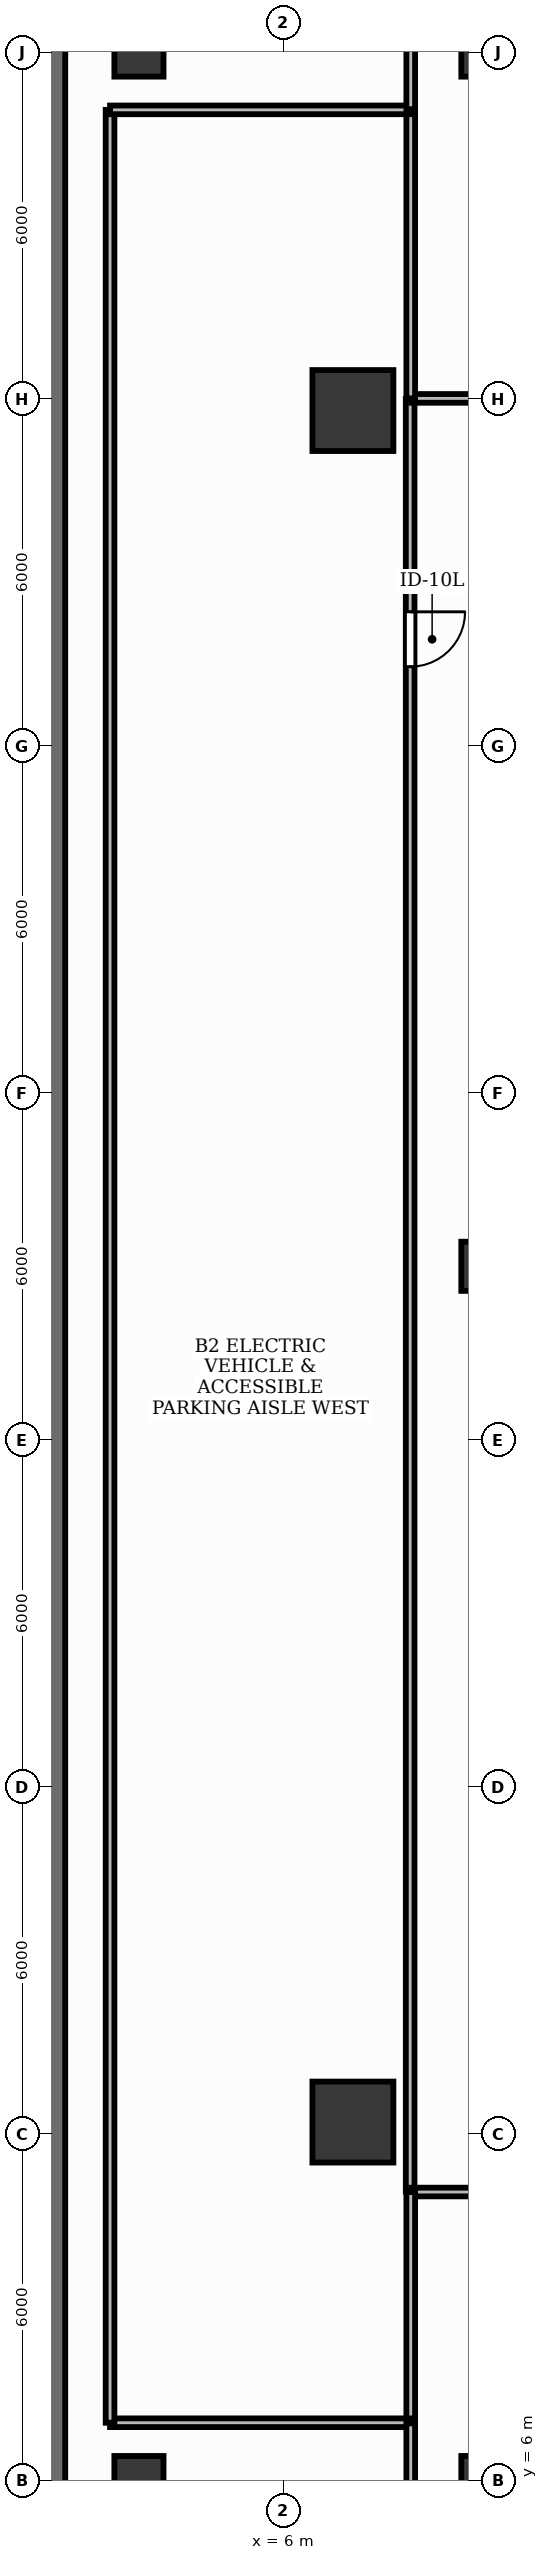
"""IFC4 building model, lengths in metres.
Left out: names, types, materials, properties, quantities, classifications, styles, units other than length and angle.
Written with IfcOpenShell. Run it as: python <this file> out.ifc"""

import sys

from ifc_helpers import new_model, si_unit, direction, frame, frame_2d, origin, origin_2d, place, context, subcontext, project, spatial, rectangle, extrude, element, fill, save


model = new_model("IFC4")
c1 = context("Model", 3, precision=1e-05, world=origin(), true_north=direction((0.0, 1.0)))
c2 = subcontext(c1, "Body", "Model", "MODEL_VIEW")
j1 = project(units=[si_unit("LENGTHUNIT", "METRE"), si_unit("PLANEANGLEUNIT", "RADIAN")], contexts=[c1])
p1 = place(None, origin())
s1 = spatial("IfcSite", under=j1, at=p1, CompositionType="ELEMENT")
p2 = place(p1, origin())
s2 = spatial("IfcBuilding", under=s1, at=p2, CompositionType="ELEMENT")
p3 = place(p2, frame((0.0, 0.0, -9.0)))
s3 = spatial("IfcBuildingStorey", under=s2, at=p3, CompositionType="ELEMENT", Elevation=-9.0)
p4 = place(p3, frame((2.0, 3.25, 0.0), z_axis=(0.0, 0.0, 1.0), x_axis=(0.0, 1.0, 0.0)))
e1 = element("IfcWall", 1, at=p4, inside=s3, PredefinedType="USERDEFINED", context=c2, shape_type="SweptSolid", body=[
    extrude(rectangle(XDim=47.5, YDim=0.45, at=frame_2d((23.75, 0.0))), origin(), (0.0, 0.0, 1.0), 4.18),
])
for number, where, z_axis, x_axis in (
    (2, (3.5, 6.0, 0.0), (0.0, 0.0, 1.0), (1.0, 0.0, 0.0)),
    (3, (3.5, 48.0, 0.0), (0.0, 0.0, 1.0), (1.0, 0.0, 0.0)),
    (4, (9.5, 6.0, 0.0), (0.0, 0.0, 1.0), (1.0, 0.0, 0.0)),
    (5, (9.5, 27.0, 0.0), (0.0, 0.0, 1.0), (1.0, 0.0, 0.0)),
    (6, (9.5, 48.0, 0.0), (0.0, 0.0, 1.0), (1.0, 0.0, 0.0)),
):
    element("IfcColumn", number, at=place(p3, frame(where, z_axis=z_axis, x_axis=x_axis)), inside=s3, PredefinedType="COLUMN", context=c2, shape_type="SweptSolid", body=[
        extrude(rectangle(XDim=0.85, YDim=0.85, at=origin_2d()), origin(), (0.0, 0.0, 1.0), 4.18),
    ])
for number, where, z_axis, x_axis in (
    (7, (7.2, 12.2, 0.0), (0.0, 0.0, 1.0), (1.0, 0.0, 0.0)),
    (8, (7.2, 41.8, 0.0), (0.0, 0.0, 1.0), (1.0, 0.0, 0.0)),
):
    element("IfcColumn", number, at=place(p3, frame(where, z_axis=z_axis, x_axis=x_axis)), inside=s3, PredefinedType="COLUMN", context=c2, shape_type="SweptSolid", body=[
        extrude(rectangle(XDim=1.4, YDim=1.4, at=origin_2d()), origin(), (0.0, 0.0, 1.0), 4.18),
    ])
p5 = place(p3, frame((8.19, 42.0, 0.0), z_axis=(0.0, 0.0, 1.0), x_axis=(0.0, -1.0, 0.0)))
e9 = element("IfcWall", 9, at=p5, inside=s3, PredefinedType="PARTITIONING", context=c2, shape_type="SweptSolid", body=[
    extrude(rectangle(XDim=31.0, YDim=0.15, at=frame_2d((15.5, 0.0))), origin(), (0.0, 0.0, 1.0), 3.04),
])
p6 = place(p5, frame((3.681, 0.0, 0.0)))
e10 = element("IfcOpeningElement", 10, at=p6, cuts=e9, PredefinedType="OPENING", context=c2, shape_type="SweptSolid", body=[
    extrude(rectangle(XDim=0.95, YDim=2.15, at=frame_2d((0.475, 1.075))), frame((0.0, 0.09, 0.0), z_axis=(0.0, -1.0, 0.0), x_axis=(1.0, 0.0, 0.0)), (0.0, 0.0, 1.0), 0.18),
])
p7 = place(p3, frame((52.0, 42.01, 0.0), z_axis=(0.0, 0.0, 1.0), x_axis=(-1.0, 0.0, 0.0)))
e11 = element("IfcWall", 11, at=p7, inside=s3, PredefinedType="PARTITIONING", context=c2, shape_type="SweptSolid", body=[
    extrude(rectangle(XDim=43.79, YDim=0.15, at=frame_2d((21.895, 0.0))), origin(), (0.0, 0.0, 1.0), 3.04),
])
p8 = place(p7, frame((3.333, 0.0, 0.0)))
e12 = element("IfcOpeningElement", 12, at=p8, cuts=e11, PredefinedType="OPENING", context=c2, shape_type="SweptSolid", body=[
    extrude(rectangle(XDim=0.95, YDim=2.15, at=frame_2d((0.475, 1.075))), frame((0.0, 0.09, 0.0), z_axis=(0.0, -1.0, 0.0), x_axis=(1.0, 0.0, 0.0)), (0.0, 0.0, 1.0), 0.18),
])
p9 = place(p3, frame((8.21, 10.99, 0.0), z_axis=(0.0, 0.0, 1.0), x_axis=(1.0, 0.0, 0.0)))
e13 = element("IfcWall", 13, at=p9, inside=s3, PredefinedType="PARTITIONING", context=c2, shape_type="SweptSolid", body=[
    extrude(rectangle(XDim=43.79, YDim=0.15, at=frame_2d((21.895, 0.0))), origin(), (0.0, 0.0, 1.0), 3.04),
])
p10 = place(p9, frame((6.435, 0.0, 0.0)))
e14 = element("IfcOpeningElement", 14, at=p10, cuts=e13, PredefinedType="OPENING", context=c2, shape_type="SweptSolid", body=[
    extrude(rectangle(XDim=0.95, YDim=2.15, at=frame_2d((0.475, 1.075))), frame((0.0, 0.09, 0.0), z_axis=(0.0, -1.0, 0.0), x_axis=(1.0, 0.0, 0.0)), (0.0, 0.0, 1.0), 0.18),
])
p11 = place(p3, frame((8.2, 47.0, 0.0), z_axis=(0.0, 0.0, 1.0), x_axis=(0.0, -1.0, 0.0)))
e15 = element("IfcWall", 15, at=p11, inside=s3, PredefinedType="PARTITIONING", context=c2, shape_type="SweptSolid", body=[
    extrude(rectangle(XDim=4.99, YDim=0.15, at=frame_2d((2.495, 0.0))), origin(), (0.0, 0.0, 1.0), 3.04),
])
p12 = place(p3, frame((8.2, 10.99, 0.0), z_axis=(0.0, 0.0, 1.0), x_axis=(0.0, -1.0, 0.0)))
e16 = element("IfcWall", 16, at=p12, inside=s3, PredefinedType="PARTITIONING", context=c2, shape_type="SweptSolid", body=[
    extrude(rectangle(XDim=3.99, YDim=0.15, at=frame_2d((1.995, 0.0))), origin(), (0.0, 0.0, 1.0), 3.04),
])
p13 = place(p3, frame((8.2, 7.0, 0.0), z_axis=(0.0, 0.0, 1.0), x_axis=(-1.0, 0.0, 0.0)))
e17 = element("IfcWall", 17, at=p13, inside=s3, PredefinedType="PARTITIONING", context=c2, shape_type="SweptSolid", body=[
    extrude(rectangle(XDim=5.2, YDim=0.15, at=frame_2d((2.6, 0.0))), origin(), (0.0, 0.0, 1.0), 3.04),
])
p14 = place(p3, frame((3.0, 7.0, 0.0), z_axis=(0.0, 0.0, 1.0), x_axis=(0.0, 1.0, 0.0)))
e18 = element("IfcWall", 18, at=p14, inside=s3, PredefinedType="PARTITIONING", context=c2, shape_type="SweptSolid", body=[
    extrude(rectangle(XDim=40.0, YDim=0.15, at=frame_2d((20.0, 0.0))), origin(), (0.0, 0.0, 1.0), 3.04),
])
p15 = place(p3, frame((3.0, 47.0, 0.0), z_axis=(0.0, 0.0, 1.0), x_axis=(1.0, 0.0, 0.0)))
e19 = element("IfcWall", 19, at=p15, inside=s3, PredefinedType="PARTITIONING", context=c2, shape_type="SweptSolid", body=[
    extrude(rectangle(XDim=5.2, YDim=0.15, at=frame_2d((2.6, 0.0))), origin(), (0.0, 0.0, 1.0), 3.04),
])
for number, where, z_axis, x_axis in (
    (20, (8.2, 47.01, 0.0), (0.0, 0.0, 1.0), (0.0, 1.0, 0.0)),
    (21, (8.2, 4.0, 0.0), (0.0, 0.0, 1.0), (0.0, 1.0, 0.0)),
):
    element("IfcWall", number, at=place(p3, frame(where, z_axis=z_axis, x_axis=x_axis)), inside=s3, PredefinedType="PARTITIONING", context=c2, shape_type="SweptSolid", body=[
        extrude(rectangle(XDim=2.99, YDim=0.15, at=frame_2d((1.495, 0.0))), origin(), (0.0, 0.0, 1.0), 3.04),
    ])
p16 = place(p6, origin())
e22 = element("IfcDoor", 22, at=p16, inside=s3, OperationType="SINGLE_SWING_LEFT", PredefinedType="DOOR", context=c2, shape_type="SweptSolid", body=[
    extrude(rectangle(XDim=0.95, YDim=2.15, at=frame_2d((0.475, 1.075))), frame((0.0, 0.025, 0.0), z_axis=(0.0, -1.0, 0.0), x_axis=(1.0, 0.0, 0.0)), (0.0, 0.0, 1.0), 0.05),
])
fill(e10, e22)
save(model, sys.argv[1])
